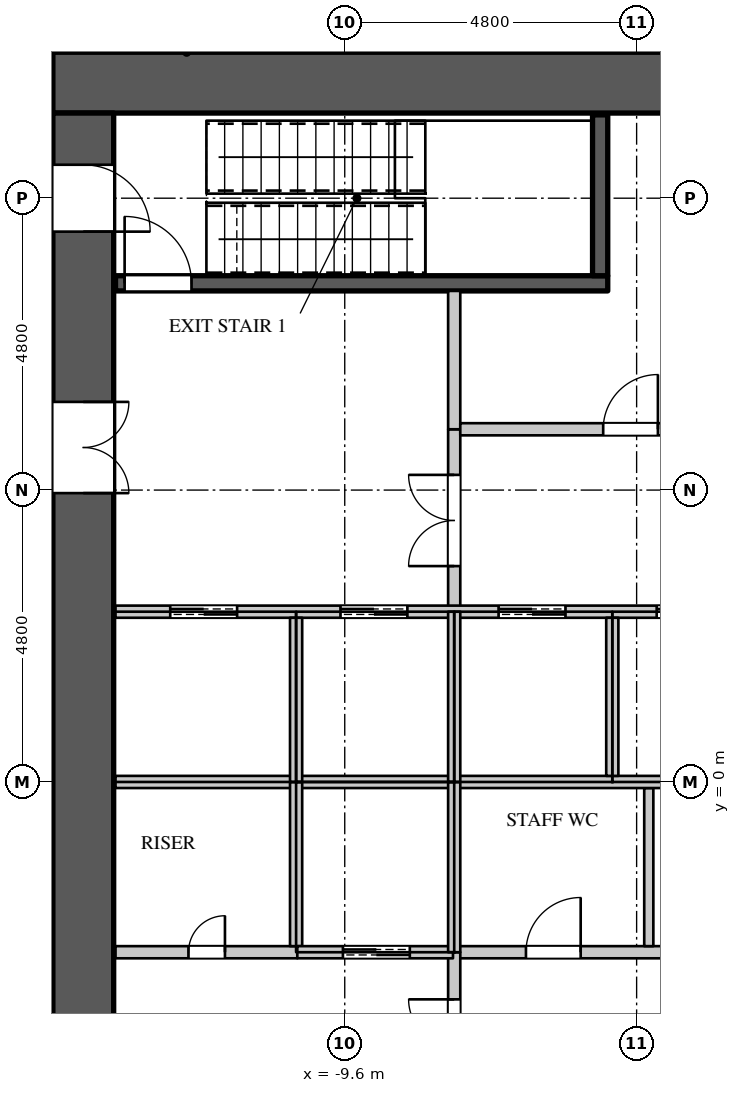
"""IFC4 building model, lengths in metres.
Left out: names, types, materials, properties, quantities, classifications, styles, units other than length and angle.
Written with IfcOpenShell. Run it as: python <this file> out.ifc"""

import sys

from ifc_helpers import new_model, si_unit, direction, frame, frame_2d, origin, place, context, subcontext, project, spatial, rectangle, extrude, element, fill, save


model = new_model("IFC4")
c1 = context("Model", 3, precision=1e-05, world=origin(), true_north=direction((0.0, 1.0)))
c2 = subcontext(c1, "Body", "Model", "MODEL_VIEW")
j1 = project(units=[si_unit("LENGTHUNIT", "METRE"), si_unit("PLANEANGLEUNIT", "RADIAN")], contexts=[c1])
p1 = place(None, origin())
s1 = spatial("IfcSite", under=j1, at=p1, CompositionType="ELEMENT")
p2 = place(p1, origin())
s2 = spatial("IfcBuilding", under=s1, at=p2, CompositionType="ELEMENT")
p3 = place(p2, frame((0.0, 0.0, 25.5)))
s3 = spatial("IfcBuildingStorey", under=s2, at=p3, CompositionType="ELEMENT", Elevation=25.5)
p4 = place(p3, frame((-14.4, 11.5, 0.0), z_axis=(0.0, 0.0, 1.0), x_axis=(1.0, 0.0, 0.0)))
e1 = element("IfcWall", 1, at=p4, inside=s3, PredefinedType="SHEAR", context=c2, shape_type="SweptSolid", body=[
    extrude(rectangle(XDim=28.8, YDim=1.0, at=frame_2d((14.4, 0.0))), origin(), (0.0, 0.0, 1.0), 4.2),
])
p5 = place(p3, frame((-13.9, -11.0, 0.0), z_axis=(0.0, 0.0, 1.0), x_axis=(0.0, 1.0, 0.0)))
e2 = element("IfcWall", 2, at=p5, inside=s3, PredefinedType="SHEAR", context=c2, shape_type="SweptSolid", body=[
    extrude(rectangle(XDim=22.0, YDim=1.0, at=frame_2d((11.0, 0.0))), origin(), (0.0, 0.0, 1.0), 4.2),
])
p6 = place(p5, frame((20.05, 0.0, 0.0)))
e3 = element("IfcOpeningElement", 3, at=p6, cuts=e2, PredefinedType="OPENING", context=c2, shape_type="SweptSolid", body=[
    extrude(rectangle(XDim=1.1, YDim=2.2, at=frame_2d((0.55, 1.1))), frame((0.0, 0.51, 0.0), z_axis=(0.0, -1.0, 0.0), x_axis=(1.0, 0.0, 0.0)), (0.0, 0.0, 1.0), 1.02),
])
p7 = place(p5, frame((0.85, 0.0, 0.0)))
e4 = element("IfcOpeningElement", 4, at=p7, cuts=e2, PredefinedType="OPENING", context=c2, shape_type="SweptSolid", body=[
    extrude(rectangle(XDim=1.1, YDim=2.2, at=frame_2d((0.55, 1.1))), frame((0.0, 0.51, 0.0), z_axis=(0.0, -1.0, 0.0), x_axis=(1.0, 0.0, 0.0)), (0.0, 0.0, 1.0), 1.02),
])
p8 = place(p5, frame((15.75, 0.0, 0.0)))
e5 = element("IfcOpeningElement", 5, at=p8, cuts=e2, PredefinedType="OPENING", context=c2, shape_type="SweptSolid", body=[
    extrude(rectangle(XDim=1.5, YDim=2.4, at=frame_2d((0.75, 1.2))), frame((0.0, 0.51, 0.0), z_axis=(0.0, -1.0, 0.0), x_axis=(1.0, 0.0, 0.0)), (0.0, 0.0, 1.0), 1.02),
])
p9 = place(p5, frame((4.75, 0.0, 0.0)))
e6 = element("IfcOpeningElement", 6, at=p9, cuts=e2, PredefinedType="OPENING", context=c2, shape_type="SweptSolid", body=[
    extrude(rectangle(XDim=1.5, YDim=2.4, at=frame_2d((0.75, 1.2))), frame((0.0, 0.51, 0.0), z_axis=(0.0, -1.0, 0.0), x_axis=(1.0, 0.0, 0.0)), (0.0, 0.0, 1.0), 1.02),
])
p10 = place(p3, frame((-7.82, -2.8, 0.0), z_axis=(0.0, 0.0, 1.0), x_axis=(1.0, 0.0, 0.0)))
e7 = element("IfcWall", 7, at=p10, inside=s3, PredefinedType="PARTITIONING", context=c2, shape_type="SweptSolid", body=[
    extrude(rectangle(XDim=15.64, YDim=0.2, at=frame_2d((7.82, 0.0))), origin(), (0.0, 0.0, 1.0), 3.95),
])
p11 = place(p10, frame((1.2, 0.0, 0.0)))
e8 = element("IfcOpeningElement", 8, at=p11, cuts=e7, PredefinedType="OPENING", context=c2, shape_type="SweptSolid", body=[
    extrude(rectangle(XDim=0.9, YDim=2.2, at=frame_2d((0.45, 1.1))), frame((0.0, 0.11, 0.0), z_axis=(0.0, -1.0, 0.0), x_axis=(1.0, 0.0, 0.0)), (0.0, 0.0, 1.0), 0.22),
])
p12 = place(p10, frame((4.7, 0.0, 0.0)))
e9 = element("IfcOpeningElement", 9, at=p12, cuts=e7, PredefinedType="OPENING", context=c2, shape_type="SweptSolid", body=[
    extrude(rectangle(XDim=0.9, YDim=2.2, at=frame_2d((0.45, 1.1))), frame((0.0, 0.11, 0.0), z_axis=(0.0, -1.0, 0.0), x_axis=(1.0, 0.0, 0.0)), (0.0, 0.0, 1.0), 0.22),
])
p13 = place(p10, frame((7.75, 0.0, 0.0)))
e10 = element("IfcOpeningElement", 10, at=p13, cuts=e7, PredefinedType="OPENING", context=c2, shape_type="SweptSolid", body=[
    extrude(rectangle(XDim=0.9, YDim=2.2, at=frame_2d((0.45, 1.1))), frame((0.0, 0.11, 0.0), z_axis=(0.0, -1.0, 0.0), x_axis=(1.0, 0.0, 0.0)), (0.0, 0.0, 1.0), 0.22),
])
p14 = place(p10, frame((10.3, 0.0, 0.0)))
e11 = element("IfcOpeningElement", 11, at=p14, cuts=e7, PredefinedType="OPENING", context=c2, shape_type="SweptSolid", body=[
    extrude(rectangle(XDim=0.9, YDim=2.2, at=frame_2d((0.45, 1.1))), frame((0.0, 0.11, 0.0), z_axis=(0.0, -1.0, 0.0), x_axis=(1.0, 0.0, 0.0)), (0.0, 0.0, 1.0), 0.22),
])
p15 = place(p10, frame((13.3, 0.0, 0.0)))
e12 = element("IfcOpeningElement", 12, at=p15, cuts=e7, PredefinedType="OPENING", context=c2, shape_type="SweptSolid", body=[
    extrude(rectangle(XDim=0.9, YDim=2.2, at=frame_2d((0.45, 1.1))), frame((0.0, 0.11, 0.0), z_axis=(0.0, -1.0, 0.0), x_axis=(1.0, 0.0, 0.0)), (0.0, 0.0, 1.0), 0.22),
])
p16 = place(p3, frame((-7.8, -8.075, 0.0), z_axis=(0.0, 0.0, 1.0), x_axis=(0.0, 1.0, 0.0)))
e13 = element("IfcWall", 13, at=p16, inside=s3, PredefinedType="PARTITIONING", context=c2, shape_type="SweptSolid", body=[
    extrude(rectangle(XDim=5.275, YDim=0.2, at=frame_2d((2.637, 0.0))), origin(), (0.0, 0.0, 1.0), 3.95),
])
p17 = place(p16, frame((3.0, 0.0, 0.0)))
e14 = element("IfcOpeningElement", 14, at=p17, cuts=e13, PredefinedType="OPENING", context=c2, shape_type="SweptSolid", body=[
    extrude(rectangle(XDim=1.5, YDim=2.4, at=frame_2d((0.75, 1.2))), frame((0.0, 0.11, 0.0), z_axis=(0.0, -1.0, 0.0), x_axis=(1.0, 0.0, 0.0)), (0.0, 0.0, 1.0), 0.22),
])
p18 = place(p3, frame((-7.8, 2.8, 0.0), z_axis=(0.0, 0.0, 1.0), x_axis=(0.0, 1.0, 0.0)))
e15 = element("IfcWall", 15, at=p18, inside=s3, PredefinedType="PARTITIONING", context=c2, shape_type="SweptSolid", body=[
    extrude(rectangle(XDim=3.0, YDim=0.2, at=frame_2d((1.5, 0.0))), origin(), (0.0, 0.0, 1.0), 3.95),
])
p19 = place(p18, frame((0.75, 0.0, 0.0)))
e16 = element("IfcOpeningElement", 16, at=p19, cuts=e15, PredefinedType="OPENING", context=c2, shape_type="SweptSolid", body=[
    extrude(rectangle(XDim=1.5, YDim=2.4, at=frame_2d((0.75, 1.2))), frame((0.0, 0.11, 0.0), z_axis=(0.0, -1.0, 0.0), x_axis=(1.0, 0.0, 0.0)), (0.0, 0.0, 1.0), 0.22),
])
p20 = place(p3, frame((-4.6, -2.7, 0.0), z_axis=(0.0, 0.0, 1.0), x_axis=(0.0, 1.0, 0.0)))
e17 = element("IfcWall", 17, at=p20, inside=s3, PredefinedType="PARTITIONING", context=c2, shape_type="SweptSolid", body=[
    extrude(rectangle(XDim=2.6, YDim=0.15, at=frame_2d((1.3, 0.0))), origin(), (0.0, 0.0, 1.0), 3.95),
])
p21 = place(p3, frame((-13.37, -2.8, 0.0), z_axis=(0.0, 0.0, 1.0), x_axis=(1.0, 0.0, 0.0)))
e18 = element("IfcWall", 18, at=p21, inside=s3, PredefinedType="PARTITIONING", context=c2, shape_type="SweptSolid", body=[
    extrude(rectangle(XDim=2.99, YDim=0.2, at=frame_2d((1.495, 0.0))), origin(), (0.0, 0.0, 1.0), 3.95),
])
p22 = place(p21, frame((1.2, 0.0, 0.0)))
e19 = element("IfcOpeningElement", 19, at=p22, cuts=e18, PredefinedType="OPENING", context=c2, shape_type="SweptSolid", body=[
    extrude(rectangle(XDim=0.6, YDim=2.0, at=frame_2d((0.3, 1.0))), frame((0.0, 0.11, 0.0), z_axis=(0.0, -1.0, 0.0), x_axis=(1.0, 0.0, 0.0)), (0.0, 0.0, 1.0), 0.22),
])
p23 = place(p3, frame((-7.8, 5.8, 0.0), z_axis=(0.0, 0.0, 1.0), x_axis=(0.0, 1.0, 0.0)))
e20 = element("IfcWall", 20, at=p23, inside=s3, PredefinedType="PARTITIONING", context=c2, shape_type="SweptSolid", body=[
    extrude(rectangle(XDim=2.275, YDim=0.2, at=frame_2d((1.137, 0.0))), origin(), (0.0, 0.0, 1.0), 3.95),
])
p24 = place(p3, frame((-7.7, 5.8, 0.0), z_axis=(0.0, 0.0, 1.0), x_axis=(1.0, 0.0, 0.0)))
e21 = element("IfcWall", 21, at=p24, inside=s3, PredefinedType="PARTITIONING", context=c2, shape_type="SweptSolid", body=[
    extrude(rectangle(XDim=12.32, YDim=0.2, at=frame_2d((6.16, 0.0))), origin(), (0.0, 0.0, 1.0), 3.95),
])
p25 = place(p24, frame((2.35, 0.0, 0.0)))
e22 = element("IfcOpeningElement", 22, at=p25, cuts=e21, PredefinedType="OPENING", context=c2, shape_type="SweptSolid", body=[
    extrude(rectangle(XDim=0.9, YDim=2.2, at=frame_2d((0.45, 1.1))), frame((0.0, 0.11, 0.0), z_axis=(0.0, -1.0, 0.0), x_axis=(1.0, 0.0, 0.0)), (0.0, 0.0, 1.0), 0.22),
])
p26 = place(p24, frame((8.4, 0.0, 0.0)))
e23 = element("IfcOpeningElement", 23, at=p26, cuts=e21, PredefinedType="OPENING", context=c2, shape_type="SweptSolid", body=[
    extrude(rectangle(XDim=0.9, YDim=2.2, at=frame_2d((0.45, 1.1))), frame((0.0, 0.11, 0.0), z_axis=(0.0, -1.0, 0.0), x_axis=(1.0, 0.0, 0.0)), (0.0, 0.0, 1.0), 0.22),
])
p27 = place(p3, frame((-13.37, 0.0, 0.0), z_axis=(0.0, 0.0, 1.0), x_axis=(1.0, 0.0, 0.0)))
e24 = element("IfcWall", 24, at=p27, inside=s3, PredefinedType="PARTITIONING", context=c2, shape_type="SweptSolid", body=[
    extrude(rectangle(XDim=23.77, YDim=0.2, at=frame_2d((11.885, 0.0))), origin(), (0.0, 0.0, 1.0), 3.95),
])
p28 = place(p3, frame((-13.37, 2.8, 0.0), z_axis=(0.0, 0.0, 1.0), x_axis=(1.0, 0.0, 0.0)))
e25 = element("IfcWall", 25, at=p28, inside=s3, PredefinedType="PARTITIONING", context=c2, shape_type="SweptSolid", body=[
    extrude(rectangle(XDim=23.77, YDim=0.2, at=frame_2d((11.885, 0.0))), origin(), (0.0, 0.0, 1.0), 3.95),
])
p29 = place(p28, frame((0.9, 0.0, 0.0)))
e26 = element("IfcOpeningElement", 26, at=p29, cuts=e25, PredefinedType="OPENING", context=c2, shape_type="SweptSolid", body=[
    extrude(rectangle(XDim=1.1, YDim=2.2, at=frame_2d((0.55, 1.1))), frame((0.0, 0.11, 0.0), z_axis=(0.0, -1.0, 0.0), x_axis=(1.0, 0.0, 0.0)), (0.0, 0.0, 1.0), 0.22),
])
p30 = place(p28, frame((3.7, 0.0, 0.0)))
e27 = element("IfcOpeningElement", 27, at=p30, cuts=e25, PredefinedType="OPENING", context=c2, shape_type="SweptSolid", body=[
    extrude(rectangle(XDim=1.1, YDim=2.2, at=frame_2d((0.55, 1.1))), frame((0.0, 0.11, 0.0), z_axis=(0.0, -1.0, 0.0), x_axis=(1.0, 0.0, 0.0)), (0.0, 0.0, 1.0), 0.22),
])
p31 = place(p28, frame((6.3, 0.0, 0.0)))
e28 = element("IfcOpeningElement", 28, at=p31, cuts=e25, PredefinedType="OPENING", context=c2, shape_type="SweptSolid", body=[
    extrude(rectangle(XDim=1.1, YDim=2.2, at=frame_2d((0.55, 1.1))), frame((0.0, 0.11, 0.0), z_axis=(0.0, -1.0, 0.0), x_axis=(1.0, 0.0, 0.0)), (0.0, 0.0, 1.0), 0.22),
])
p32 = place(p28, frame((8.9, 0.0, 0.0)))
e29 = element("IfcOpeningElement", 29, at=p32, cuts=e25, PredefinedType="OPENING", context=c2, shape_type="SweptSolid", body=[
    extrude(rectangle(XDim=1.1, YDim=2.2, at=frame_2d((0.55, 1.1))), frame((0.0, 0.11, 0.0), z_axis=(0.0, -1.0, 0.0), x_axis=(1.0, 0.0, 0.0)), (0.0, 0.0, 1.0), 0.22),
])
p33 = place(p28, frame((11.5, 0.0, 0.0)))
e30 = element("IfcOpeningElement", 30, at=p33, cuts=e25, PredefinedType="OPENING", context=c2, shape_type="SweptSolid", body=[
    extrude(rectangle(XDim=1.1, YDim=2.2, at=frame_2d((0.55, 1.1))), frame((0.0, 0.11, 0.0), z_axis=(0.0, -1.0, 0.0), x_axis=(1.0, 0.0, 0.0)), (0.0, 0.0, 1.0), 0.22),
])
p34 = place(p28, frame((14.1, 0.0, 0.0)))
e31 = element("IfcOpeningElement", 31, at=p34, cuts=e25, PredefinedType="OPENING", context=c2, shape_type="SweptSolid", body=[
    extrude(rectangle(XDim=1.1, YDim=2.2, at=frame_2d((0.55, 1.1))), frame((0.0, 0.11, 0.0), z_axis=(0.0, -1.0, 0.0), x_axis=(1.0, 0.0, 0.0)), (0.0, 0.0, 1.0), 0.22),
])
p35 = place(p28, frame((16.7, 0.0, 0.0)))
e32 = element("IfcOpeningElement", 32, at=p35, cuts=e25, PredefinedType="OPENING", context=c2, shape_type="SweptSolid", body=[
    extrude(rectangle(XDim=1.1, YDim=2.2, at=frame_2d((0.55, 1.1))), frame((0.0, 0.11, 0.0), z_axis=(0.0, -1.0, 0.0), x_axis=(1.0, 0.0, 0.0)), (0.0, 0.0, 1.0), 0.22),
])
p36 = place(p28, frame((19.3, 0.0, 0.0)))
e33 = element("IfcOpeningElement", 33, at=p36, cuts=e25, PredefinedType="OPENING", context=c2, shape_type="SweptSolid", body=[
    extrude(rectangle(XDim=1.1, YDim=2.2, at=frame_2d((0.55, 1.1))), frame((0.0, 0.11, 0.0), z_axis=(0.0, -1.0, 0.0), x_axis=(1.0, 0.0, 0.0)), (0.0, 0.0, 1.0), 0.22),
])
p37 = place(p3, frame((-10.4, -2.7, 0.0), z_axis=(0.0, 0.0, 1.0), x_axis=(0.0, 1.0, 0.0)))
e34 = element("IfcWall", 34, at=p37, inside=s3, PredefinedType="PARTITIONING", context=c2, shape_type="SweptSolid", body=[
    extrude(rectangle(XDim=2.7, YDim=0.2, at=frame_2d((1.35, 0.0))), origin(), (0.0, 0.0, 1.0), 3.95),
])
p38 = place(p3, frame((-10.38, -2.8, 0.0), z_axis=(0.0, 0.0, 1.0), x_axis=(1.0, 0.0, 0.0)))
e35 = element("IfcWall", 35, at=p38, inside=s3, PredefinedType="PARTITIONING", context=c2, shape_type="SweptSolid", body=[
    extrude(rectangle(XDim=2.56, YDim=0.2, at=frame_2d((1.28, 0.0))), origin(), (0.0, 0.0, 1.0), 3.95),
])
p39 = place(p38, frame((0.75, 0.0, 0.0)))
e36 = element("IfcOpeningElement", 36, at=p39, cuts=e35, PredefinedType="OPENING", context=c2, shape_type="SweptSolid", body=[
    extrude(rectangle(XDim=1.1, YDim=2.2, at=frame_2d((0.55, 1.1))), frame((0.0, 0.11, 0.0), z_axis=(0.0, -1.0, 0.0), x_axis=(1.0, 0.0, 0.0)), (0.0, 0.0, 1.0), 0.22),
])
p40 = place(p3, frame((-10.4, 0.0, 0.0), z_axis=(0.0, 0.0, 1.0), x_axis=(0.0, 1.0, 0.0)))
e37 = element("IfcWall", 37, at=p40, inside=s3, PredefinedType="PARTITIONING", context=c2, shape_type="SweptSolid", body=[
    extrude(rectangle(XDim=2.7, YDim=0.2, at=frame_2d((1.35, 0.0))), origin(), (0.0, 0.0, 1.0), 3.95),
])
for number, where, z_axis, x_axis in (
    (38, (-7.8, -2.8, 0.0), (0.0, 0.0, 1.0), (0.0, 1.0, 0.0)),
    (39, (-7.8, 0.0, 0.0), (0.0, 0.0, 1.0), (0.0, 1.0, 0.0)),
):
    element("IfcWall", number, at=place(p3, frame(where, z_axis=z_axis, x_axis=x_axis)), inside=s3, PredefinedType="PARTITIONING", context=c2, shape_type="SweptSolid", body=[
        extrude(rectangle(XDim=2.8, YDim=0.2, at=frame_2d((1.4, 0.0))), origin(), (0.0, 0.0, 1.0), 3.95),
    ])
p41 = place(p3, frame((-5.2, 0.1, 0.0), z_axis=(0.0, 0.0, 1.0), x_axis=(0.0, 1.0, 0.0)))
e40 = element("IfcWall", 40, at=p41, inside=s3, PredefinedType="PARTITIONING", context=c2, shape_type="SweptSolid", body=[
    extrude(rectangle(XDim=2.6, YDim=0.2, at=frame_2d((1.3, 0.0))), origin(), (0.0, 0.0, 1.0), 3.95),
])
p42 = place(p3, frame((-13.37, 8.2, 0.0), z_axis=(0.0, 0.0, 1.0), x_axis=(1.0, 0.0, 0.0)))
e41 = element("IfcWall", 41, at=p42, inside=s3, PredefinedType="SHEAR", context=c2, shape_type="SweptSolid", body=[
    extrude(rectangle(XDim=8.095, YDim=0.25, at=frame_2d((4.048, 0.0))), origin(), (0.0, 0.0, 1.0), 3.95),
])
p43 = place(p42, frame((0.15, 0.0, 0.0)))
e42 = element("IfcOpeningElement", 42, at=p43, cuts=e41, PredefinedType="OPENING", context=c2, shape_type="SweptSolid", body=[
    extrude(rectangle(XDim=1.1, YDim=2.2, at=frame_2d((0.55, 1.1))), frame((0.0, 0.135, 0.0), z_axis=(0.0, -1.0, 0.0), x_axis=(1.0, 0.0, 0.0)), (0.0, 0.0, 1.0), 0.27),
])
p44 = place(p3, frame((-5.4, 8.325, 0.0), z_axis=(0.0, 0.0, 1.0), x_axis=(0.0, 1.0, 0.0)))
e43 = element("IfcWall", 43, at=p44, inside=s3, PredefinedType="SHEAR", context=c2, shape_type="SweptSolid", body=[
    extrude(rectangle(XDim=2.645, YDim=0.25, at=frame_2d((1.323, 0.0))), origin(), (0.0, 0.0, 1.0), 3.95),
])
p45 = place(p22, origin())
e44 = element("IfcDoor", 44, at=p45, inside=s3, OperationType="SINGLE_SWING_RIGHT", PredefinedType="DOOR", context=c2, shape_type="SweptSolid", body=[
    extrude(rectangle(XDim=0.6, YDim=2.0, at=frame_2d((0.3, 1.0))), frame((0.0, 0.025, 0.0), z_axis=(0.0, -1.0, 0.0), x_axis=(1.0, 0.0, 0.0)), (0.0, 0.0, 1.0), 0.05),
])
fill(e19, e44)
p46 = place(p25, origin())
e45 = element("IfcDoor", 45, at=p46, inside=s3, OperationType="SINGLE_SWING_RIGHT", PredefinedType="DOOR", context=c2, shape_type="SweptSolid", body=[
    extrude(rectangle(XDim=0.9, YDim=2.2, at=frame_2d((0.45, 1.1))), frame((0.0, 0.025, 0.0), z_axis=(0.0, -1.0, 0.0), x_axis=(1.0, 0.0, 0.0)), (0.0, 0.0, 1.0), 0.05),
])
fill(e22, e45)
p47 = place(p11, origin())
e46 = element("IfcDoor", 46, at=p47, inside=s3, OperationType="SINGLE_SWING_RIGHT", PredefinedType="DOOR", context=c2, shape_type="SweptSolid", body=[
    extrude(rectangle(XDim=0.9, YDim=2.2, at=frame_2d((0.45, 1.1))), frame((0.0, 0.025, 0.0), z_axis=(0.0, -1.0, 0.0), x_axis=(1.0, 0.0, 0.0)), (0.0, 0.0, 1.0), 0.05),
])
fill(e8, e46)
p48 = place(p29, origin())
e47 = element("IfcDoor", 47, at=p48, inside=s3, OperationType="DOUBLE_DOOR_SLIDING", PredefinedType="DOOR", context=c2, shape_type="SweptSolid", body=[
    extrude(rectangle(XDim=1.1, YDim=2.2, at=frame_2d((0.55, 1.1))), frame((0.0, 0.025, 0.0), z_axis=(0.0, -1.0, 0.0), x_axis=(1.0, 0.0, 0.0)), (0.0, 0.0, 1.0), 0.05),
])
fill(e26, e47)
p49 = place(p30, origin())
e48 = element("IfcDoor", 48, at=p49, inside=s3, OperationType="DOUBLE_DOOR_SLIDING", PredefinedType="DOOR", context=c2, shape_type="SweptSolid", body=[
    extrude(rectangle(XDim=1.1, YDim=2.2, at=frame_2d((0.55, 1.1))), frame((0.0, 0.025, 0.0), z_axis=(0.0, -1.0, 0.0), x_axis=(1.0, 0.0, 0.0)), (0.0, 0.0, 1.0), 0.05),
])
fill(e27, e48)
p50 = place(p39, origin())
e49 = element("IfcDoor", 49, at=p50, inside=s3, OperationType="DOUBLE_DOOR_SLIDING", PredefinedType="DOOR", context=c2, shape_type="SweptSolid", body=[
    extrude(rectangle(XDim=1.1, YDim=2.2, at=frame_2d((0.55, 1.1))), frame((0.0, 0.025, 0.0), z_axis=(0.0, -1.0, 0.0), x_axis=(1.0, 0.0, 0.0)), (0.0, 0.0, 1.0), 0.05),
])
fill(e36, e49)
p51 = place(p31, origin())
e50 = element("IfcDoor", 50, at=p51, inside=s3, OperationType="DOUBLE_DOOR_SLIDING", PredefinedType="DOOR", context=c2, shape_type="SweptSolid", body=[
    extrude(rectangle(XDim=1.1, YDim=2.2, at=frame_2d((0.55, 1.1))), frame((0.0, 0.025, 0.0), z_axis=(0.0, -1.0, 0.0), x_axis=(1.0, 0.0, 0.0)), (0.0, 0.0, 1.0), 0.05),
])
fill(e28, e50)
p52 = place(p32, origin())
e51 = element("IfcDoor", 51, at=p52, inside=s3, OperationType="DOUBLE_DOOR_SLIDING", PredefinedType="DOOR", context=c2, shape_type="SweptSolid", body=[
    extrude(rectangle(XDim=1.1, YDim=2.2, at=frame_2d((0.55, 1.1))), frame((0.0, 0.025, 0.0), z_axis=(0.0, -1.0, 0.0), x_axis=(1.0, 0.0, 0.0)), (0.0, 0.0, 1.0), 0.05),
])
fill(e29, e51)
p53 = place(p43, origin())
e52 = element("IfcDoor", 52, at=p53, inside=s3, OperationType="SINGLE_SWING_LEFT", PredefinedType="DOOR", context=c2, shape_type="SweptSolid", body=[
    extrude(rectangle(XDim=1.1, YDim=2.2, at=frame_2d((0.55, 1.1))), frame((0.0, 0.025, 0.0), z_axis=(0.0, -1.0, 0.0), x_axis=(1.0, 0.0, 0.0)), (0.0, 0.0, 1.0), 0.05),
])
fill(e42, e52)
p54 = place(p19, origin())
e53 = element("IfcDoor", 53, at=p54, inside=s3, OperationType="DOUBLE_DOOR_SINGLE_SWING", PredefinedType="DOOR", context=c2, shape_type="SweptSolid", body=[
    extrude(rectangle(XDim=1.5, YDim=2.4, at=frame_2d((0.75, 1.2))), frame((0.0, 0.025, 0.0), z_axis=(0.0, -1.0, 0.0), x_axis=(1.0, 0.0, 0.0)), (0.0, 0.0, 1.0), 0.05),
])
fill(e16, e53)
p55 = place(p17, origin())
e54 = element("IfcDoor", 54, at=p55, inside=s3, OperationType="DOUBLE_DOOR_SINGLE_SWING", PredefinedType="DOOR", context=c2, shape_type="SweptSolid", body=[
    extrude(rectangle(XDim=1.5, YDim=2.4, at=frame_2d((0.75, 1.2))), frame((0.0, 0.025, 0.0), z_axis=(0.0, -1.0, 0.0), x_axis=(1.0, 0.0, 0.0)), (0.0, 0.0, 1.0), 0.05),
])
fill(e14, e54)
p56 = place(p6, origin())
e55 = element("IfcDoor", 55, at=p56, inside=s3, OperationType="SINGLE_SWING_RIGHT", PredefinedType="DOOR", context=c2, shape_type="SweptSolid", body=[
    extrude(rectangle(XDim=1.1, YDim=2.2, at=frame_2d((0.55, 1.1))), frame((0.0, -0.445, 0.0), z_axis=(0.0, -1.0, 0.0), x_axis=(1.0, 0.0, 0.0)), (0.0, 0.0, 1.0), 0.05),
])
fill(e3, e55)
p57 = place(p8, origin())
e56 = element("IfcDoor", 56, at=p57, inside=s3, OperationType="DOUBLE_DOOR_SINGLE_SWING", PredefinedType="DOOR", context=c2, shape_type="SweptSolid", body=[
    extrude(rectangle(XDim=1.5, YDim=2.4, at=frame_2d((0.75, 1.2))), frame((0.0, -0.445, 0.0), z_axis=(0.0, -1.0, 0.0), x_axis=(1.0, 0.0, 0.0)), (0.0, 0.0, 1.0), 0.05),
])
fill(e5, e56)
save(model, sys.argv[1])
